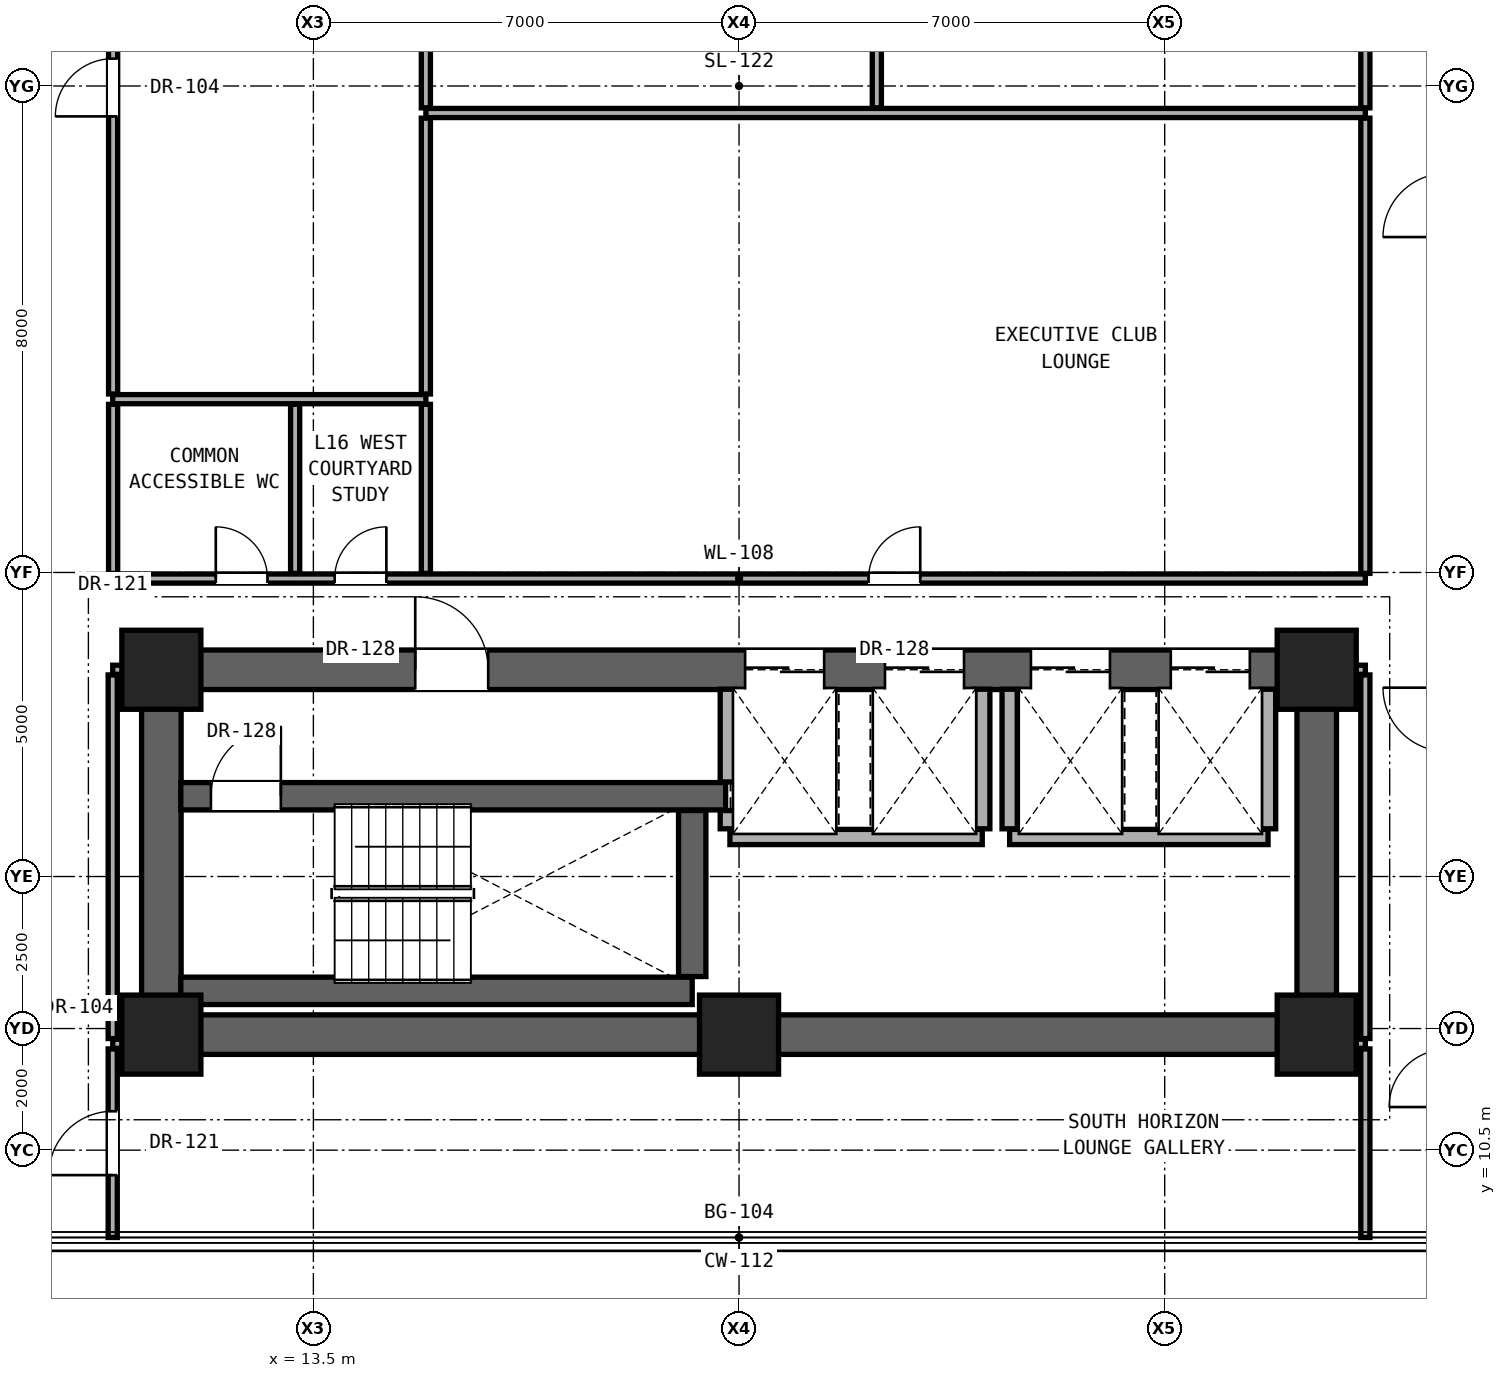
"""IFC4 building model, lengths in metres.
Left out: names, types, materials, properties, quantities, classifications, styles, units other than length and angle.
Written with IfcOpenShell. Run it as: python <this file> out.ifc"""

import sys

from ifc_helpers import new_model, si_unit, direction, frame, frame_2d, origin, origin_2d, place, context, subcontext, project, spatial, rectangle, extrude, element, fill, save


model = new_model("IFC4")
c1 = context("Model", 3, precision=1e-05, world=origin(), true_north=direction((0.0, 1.0)))
c2 = subcontext(c1, "Body", "Model", "MODEL_VIEW")
j1 = project(units=[si_unit("LENGTHUNIT", "METRE"), si_unit("PLANEANGLEUNIT", "RADIAN")], contexts=[c1])
p1 = place(None, origin())
s1 = spatial("IfcSite", under=j1, at=p1, CompositionType="ELEMENT")
p2 = place(p1, origin())
s2 = spatial("IfcBuilding", under=s1, at=p2, CompositionType="ELEMENT")
p3 = place(p2, frame((0.0, 0.0, 58.7)))
s3 = spatial("IfcBuildingStorey", under=s2, at=p3, CompositionType="ELEMENT", Elevation=58.7)
for number, where, z_axis, x_axis in (
    (1, (11.0, 12.4, 0.0), (0.0, 0.0, 1.0), (1.0, 0.0, 0.0)),
    (2, (20.5, 12.4, 0.0), (0.0, 0.0, 1.0), (1.0, 0.0, 0.0)),
    (3, (30.0, 12.4, 0.0), (0.0, 0.0, 1.0), (1.0, 0.0, 0.0)),
    (4, (11.0, 18.4, 0.0), (0.0, 0.0, 1.0), (1.0, 0.0, 0.0)),
    (5, (30.0, 18.4, 0.0), (0.0, 0.0, 1.0), (1.0, 0.0, 0.0)),
):
    element("IfcColumn", number, at=place(p3, frame(where, z_axis=z_axis, x_axis=x_axis)), inside=s3, PredefinedType="COLUMN", context=c2, shape_type="SweptSolid", body=[
        extrude(rectangle(XDim=1.3, YDim=1.3, at=origin_2d()), origin(), (0.0, 0.0, 1.0), 3.3),
    ])
p4 = place(p3, frame((11.0, 12.4, 0.0), z_axis=(0.0, 0.0, 1.0), x_axis=(1.0, 0.0, 0.0)))
e6 = element("IfcWall", 6, at=p4, inside=s3, PredefinedType="SHEAR", context=c2, shape_type="SweptSolid", body=[
    extrude(rectangle(XDim=19.0, YDim=0.65, at=frame_2d((9.5, 0.0))), origin(), (0.0, 0.0, 1.0), 3.06),
])
for number, where, z_axis, x_axis in (
    (7, (11.0, 12.4, 0.0), (0.0, 0.0, 1.0), (0.0, 1.0, 0.0)),
    (8, (30.0, 12.4, 0.0), (0.0, 0.0, 1.0), (0.0, 1.0, 0.0)),
):
    element("IfcWall", number, at=place(p3, frame(where, z_axis=z_axis, x_axis=x_axis)), inside=s3, PredefinedType="SHEAR", context=c2, shape_type="SweptSolid", body=[
        extrude(rectangle(XDim=6.0, YDim=0.65, at=frame_2d((3.0, 0.0))), origin(), (0.0, 0.0, 1.0), 3.06),
    ])
p5 = place(p3, frame((11.0, 18.4, 0.0), z_axis=(0.0, 0.0, 1.0), x_axis=(1.0, 0.0, 0.0)))
e9 = element("IfcWall", 9, at=p5, inside=s3, PredefinedType="SHEAR", context=c2, shape_type="SweptSolid", body=[
    extrude(rectangle(XDim=19.0, YDim=0.65, at=frame_2d((9.5, 0.0))), origin(), (0.0, 0.0, 1.0), 3.06),
])
p6 = place(p5, frame((4.175, 0.0, 0.0)))
e10 = element("IfcOpeningElement", 10, at=p6, cuts=e9, PredefinedType="OPENING", context=c2, shape_type="SweptSolid", body=[
    extrude(rectangle(XDim=1.2, YDim=2.25, at=frame_2d((0.6, 1.125))), frame((0.0, 0.335, 0.0), z_axis=(0.0, -1.0, 0.0), x_axis=(1.0, 0.0, 0.0)), (0.0, 0.0, 1.0), 0.67),
])
p7 = place(p5, frame((9.6, 0.0, 0.0)))
e11 = element("IfcOpeningElement", 11, at=p7, cuts=e9, PredefinedType="OPENING", context=c2, shape_type="SweptSolid", body=[
    extrude(rectangle(XDim=1.3, YDim=2.3, at=frame_2d((0.65, 1.15))), frame((0.0, 0.335, 0.0), z_axis=(0.0, -1.0, 0.0), x_axis=(1.0, 0.0, 0.0)), (0.0, 0.0, 1.0), 0.67),
])
p8 = place(p5, frame((11.9, 0.0, 0.0)))
e12 = element("IfcOpeningElement", 12, at=p8, cuts=e9, PredefinedType="OPENING", context=c2, shape_type="SweptSolid", body=[
    extrude(rectangle(XDim=1.3, YDim=2.3, at=frame_2d((0.65, 1.15))), frame((0.0, 0.335, 0.0), z_axis=(0.0, -1.0, 0.0), x_axis=(1.0, 0.0, 0.0)), (0.0, 0.0, 1.0), 0.67),
])
p9 = place(p5, frame((14.3, 0.0, 0.0)))
e13 = element("IfcOpeningElement", 13, at=p9, cuts=e9, PredefinedType="OPENING", context=c2, shape_type="SweptSolid", body=[
    extrude(rectangle(XDim=1.3, YDim=2.3, at=frame_2d((0.65, 1.15))), frame((0.0, 0.335, 0.0), z_axis=(0.0, -1.0, 0.0), x_axis=(1.0, 0.0, 0.0)), (0.0, 0.0, 1.0), 0.67),
])
p10 = place(p5, frame((16.6, 0.0, 0.0)))
e14 = element("IfcOpeningElement", 14, at=p10, cuts=e9, PredefinedType="OPENING", context=c2, shape_type="SweptSolid", body=[
    extrude(rectangle(XDim=1.3, YDim=2.3, at=frame_2d((0.65, 1.15))), frame((0.0, 0.335, 0.0), z_axis=(0.0, -1.0, 0.0), x_axis=(1.0, 0.0, 0.0)), (0.0, 0.0, 1.0), 0.67),
])
for number, where, z_axis, x_axis in (
    (15, (10.2, 12.25, 0.0), (0.0, 0.0, 1.0), (1.0, 0.0, 0.0)),
    (16, (30.32, 12.25, 0.0), (0.0, 0.0, 1.0), (1.0, 0.0, 0.0)),
):
    element("IfcWall", number, at=place(p3, frame(where, z_axis=z_axis, x_axis=x_axis)), inside=s3, PredefinedType="PARTITIONING", context=c2, shape_type="SweptSolid", body=[
        extrude(rectangle(XDim=0.48, YDim=0.15, at=frame_2d((0.24, 0.0))), origin(), (0.0, 0.0, 1.0), 3.06),
    ])
p11 = place(p3, frame((11.32, 13.12, 0.0), z_axis=(0.0, 0.0, 1.0), x_axis=(1.0, 0.0, 0.0)))
e17 = element("IfcWall", 17, at=p11, inside=s3, PredefinedType="SHEAR", context=c2, shape_type="SweptSolid", body=[
    extrude(rectangle(XDim=8.41, YDim=0.45, at=frame_2d((4.205, 0.0))), origin(), (0.0, 0.0, 1.0), 3.06),
])
p12 = place(p3, frame((20.35, 15.65, 0.0), z_axis=(0.0, 0.0, 1.0), x_axis=(1.0, 0.0, 0.0)))
e18 = element("IfcWall", 18, at=p12, inside=s3, PredefinedType="SOLIDWALL", context=c2, shape_type="SweptSolid", body=[
    extrude(rectangle(XDim=4.15, YDim=0.25, at=frame_2d((2.075, 0.0))), origin(), (0.0, 0.0, 1.0), 3.06),
])
p13 = place(p3, frame((24.95, 15.65, 0.0), z_axis=(0.0, 0.0, 1.0), x_axis=(1.0, 0.0, 0.0)))
e19 = element("IfcWall", 19, at=p13, inside=s3, PredefinedType="SOLIDWALL", context=c2, shape_type="SweptSolid", body=[
    extrude(rectangle(XDim=4.25, YDim=0.25, at=frame_2d((2.125, 0.0))), origin(), (0.0, 0.0, 1.0), 3.06),
])
p14 = place(p3, frame((11.32, 16.32, 0.0), z_axis=(0.0, 0.0, 1.0), x_axis=(1.0, 0.0, 0.0)))
e20 = element("IfcWall", 20, at=p14, inside=s3, PredefinedType="SHEAR", context=c2, shape_type="SweptSolid", body=[
    extrude(rectangle(XDim=8.96, YDim=0.45, at=frame_2d((4.48, 0.0))), origin(), (0.0, 0.0, 1.0), 3.06),
])
p15 = place(p14, frame((0.495, 0.0, 0.0)))
e21 = element("IfcOpeningElement", 21, at=p15, cuts=e20, PredefinedType="OPENING", context=c2, shape_type="SweptSolid", body=[
    extrude(rectangle(XDim=1.15, YDim=2.2, at=frame_2d((0.575, 1.1))), frame((0.0, 0.235, 0.0), z_axis=(0.0, -1.0, 0.0), x_axis=(1.0, 0.0, 0.0)), (0.0, 0.0, 1.0), 0.47),
])
for number, where, z_axis, x_axis in (
    (22, (10.2, 18.4, 0.0), (0.0, 0.0, 1.0), (1.0, 0.0, 0.0)),
    (23, (30.32, 18.4, 0.0), (0.0, 0.0, 1.0), (1.0, 0.0, 0.0)),
):
    element("IfcWall", number, at=place(p3, frame(where, z_axis=z_axis, x_axis=x_axis)), inside=s3, PredefinedType="PARTITIONING", context=c2, shape_type="SweptSolid", body=[
        extrude(rectangle(XDim=0.48, YDim=0.15, at=frame_2d((0.24, 0.0))), origin(), (0.0, 0.0, 1.0), 2.436),
    ])
p16 = place(p3, frame((10.2, 19.9, 0.0), z_axis=(0.0, 0.0, 1.0), x_axis=(1.0, 0.0, 0.0)))
e24 = element("IfcWall", 24, at=p16, inside=s3, PredefinedType="PARTITIONING", context=c2, shape_type="SweptSolid", body=[
    extrude(rectangle(XDim=20.6, YDim=0.15, at=frame_2d((10.3, 0.0))), origin(), (0.0, 0.0, 1.0), 2.104),
])
p17 = place(p16, frame((1.695, 0.0, 0.0)))
e25 = element("IfcOpeningElement", 25, at=p17, cuts=e24, PredefinedType="OPENING", context=c2, shape_type="SweptSolid", body=[
    extrude(rectangle(XDim=0.85, YDim=2.01, at=frame_2d((0.425, 1.005))), frame((0.0, 0.085, 0.0), z_axis=(0.0, -1.0, 0.0), x_axis=(1.0, 0.0, 0.0)), (0.0, 0.0, 1.0), 0.17),
])
p18 = place(p16, frame((3.65, 0.0, 0.0)))
e26 = element("IfcOpeningElement", 26, at=p18, cuts=e24, PredefinedType="OPENING", context=c2, shape_type="SweptSolid", body=[
    extrude(rectangle(XDim=0.85, YDim=2.01, at=frame_2d((0.425, 1.005))), frame((0.0, 0.085, 0.0), z_axis=(0.0, -1.0, 0.0), x_axis=(1.0, 0.0, 0.0)), (0.0, 0.0, 1.0), 0.17),
])
p19 = place(p16, frame((12.43, 0.0, 0.0)))
e27 = element("IfcOpeningElement", 27, at=p19, cuts=e24, PredefinedType="OPENING", context=c2, shape_type="SweptSolid", body=[
    extrude(rectangle(XDim=0.85, YDim=2.01, at=frame_2d((0.425, 1.005))), frame((0.0, 0.085, 0.0), z_axis=(0.0, -1.0, 0.0), x_axis=(1.0, 0.0, 0.0)), (0.0, 0.0, 1.0), 0.17),
])
p20 = place(p3, frame((10.2, 22.85, 0.0), z_axis=(0.0, 0.0, 1.0), x_axis=(1.0, 0.0, 0.0)))
e28 = element("IfcWall", 28, at=p20, inside=s3, PredefinedType="PARTITIONING", context=c2, shape_type="SweptSolid", body=[
    extrude(rectangle(XDim=5.15, YDim=0.15, at=frame_2d((2.575, 0.0))), origin(), (0.0, 0.0, 1.0), 2.104),
])
p21 = place(p3, frame((15.35, 27.556, 0.0), z_axis=(0.0, 0.0, 1.0), x_axis=(1.0, 0.0, 0.0)))
e29 = element("IfcWall", 29, at=p21, inside=s3, PredefinedType="PARTITIONING", context=c2, shape_type="SweptSolid", body=[
    extrude(rectangle(XDim=15.45, YDim=0.15, at=frame_2d((7.725, 0.0))), origin(), (0.0, 0.0, 1.0), 2.104),
])
p22 = place(p3, frame((10.2, 9.064, 0.0), z_axis=(0.0, 0.0, 1.0), x_axis=(0.0, 1.0, 0.0)))
e30 = element("IfcWall", 30, at=p22, inside=s3, PredefinedType="PARTITIONING", context=c2, shape_type="SweptSolid", body=[
    extrude(rectangle(XDim=3.101, YDim=0.15, at=frame_2d((1.551, 0.0))), origin(), (0.0, 0.0, 1.0), 3.06),
])
p23 = place(p22, frame((1.025, 0.0, 0.0)))
e31 = element("IfcOpeningElement", 31, at=p23, cuts=e30, PredefinedType="OPENING", context=c2, shape_type="SweptSolid", body=[
    extrude(rectangle(XDim=1.05, YDim=2.2, at=frame_2d((0.525, 1.1))), frame((0.0, 0.085, 0.0), z_axis=(0.0, -1.0, 0.0), x_axis=(1.0, 0.0, 0.0)), (0.0, 0.0, 1.0), 0.17),
])
p24 = place(p3, frame((10.2, 12.335, 0.0), z_axis=(0.0, 0.0, 1.0), x_axis=(0.0, 1.0, 0.0)))
e32 = element("IfcWall", 32, at=p24, inside=s3, PredefinedType="PARTITIONING", context=c2, shape_type="SweptSolid", body=[
    extrude(rectangle(XDim=5.98, YDim=0.15, at=frame_2d((2.99, 0.0))), origin(), (0.0, 0.0, 1.0), 2.436),
])
p25 = place(p3, frame((10.207, 19.985, 0.0), z_axis=(0.0, 0.0, 1.0), x_axis=(0.0, 1.0, 0.0)))
e33 = element("IfcWall", 33, at=p25, inside=s3, PredefinedType="PARTITIONING", context=c2, shape_type="SweptSolid", body=[
    extrude(rectangle(XDim=2.78, YDim=0.15, at=frame_2d((1.39, 0.0))), origin(), (0.0, 0.0, 1.0), 3.06),
])
p26 = place(p3, frame((10.207, 22.935, 0.0), z_axis=(0.0, 0.0, 1.0), x_axis=(0.0, 1.0, 0.0)))
e34 = element("IfcWall", 34, at=p26, inside=s3, PredefinedType="PARTITIONING", context=c2, shape_type="SweptSolid", body=[
    extrude(rectangle(XDim=10.08, YDim=0.15, at=frame_2d((5.04, 0.0))), origin(), (0.0, 0.0, 1.0), 2.279),
])
p27 = place(p26, frame((4.565, 0.0, 0.0)))
e35 = element("IfcOpeningElement", 35, at=p27, cuts=e34, PredefinedType="OPENING", context=c2, shape_type="SweptSolid", body=[
    extrude(rectangle(XDim=0.95, YDim=2.15, at=frame_2d((0.475, 1.075))), frame((0.0, 0.085, 0.0), z_axis=(0.0, -1.0, 0.0), x_axis=(1.0, 0.0, 0.0)), (0.0, 0.0, 1.0), 0.17),
])
for number, where, z_axis, x_axis in (
    (36, (13.2, 19.985, 0.0), (0.0, 0.0, 1.0), (0.0, 1.0, 0.0)),
    (37, (15.35, 19.985, 0.0), (0.0, 0.0, 1.0), (0.0, 1.0, 0.0)),
):
    element("IfcWall", number, at=place(p3, frame(where, z_axis=z_axis, x_axis=x_axis)), inside=s3, PredefinedType="PARTITIONING", context=c2, shape_type="SweptSolid", body=[
        extrude(rectangle(XDim=2.78, YDim=0.15, at=frame_2d((1.39, 0.0))), origin(), (0.0, 0.0, 1.0), 3.06),
    ])
p28 = place(p3, frame((15.35, 22.935, 0.0), z_axis=(0.0, 0.0, 1.0), x_axis=(0.0, 1.0, 0.0)))
e38 = element("IfcWall", 38, at=p28, inside=s3, PredefinedType="PARTITIONING", context=c2, shape_type="SweptSolid", body=[
    extrude(rectangle(XDim=4.536, YDim=0.15, at=frame_2d((2.268, 0.0))), origin(), (0.0, 0.0, 1.0), 2.104),
])
p29 = place(p3, frame((15.35, 27.641, 0.0), z_axis=(0.0, 0.0, 1.0), x_axis=(0.0, 1.0, 0.0)))
e39 = element("IfcWall", 39, at=p29, inside=s3, PredefinedType="PARTITIONING", context=c2, shape_type="SweptSolid", body=[
    extrude(rectangle(XDim=5.374, YDim=0.15, at=frame_2d((2.687, 0.0))), origin(), (0.0, 0.0, 1.0), 2.104),
])
p30 = place(p3, frame((19.73, 13.355, 0.0), z_axis=(0.0, 0.0, 1.0), x_axis=(0.0, 1.0, 0.0)))
e40 = element("IfcWall", 40, at=p30, inside=s3, PredefinedType="SHEAR", context=c2, shape_type="SweptSolid", body=[
    extrude(rectangle(XDim=2.73, YDim=0.45, at=frame_2d((1.365, 0.0))), origin(), (0.0, 0.0, 1.0), 3.06),
])
p31 = place(p3, frame((20.315, 15.785, 0.0), z_axis=(0.0, 0.0, 1.0), x_axis=(0.0, 1.0, 0.0)))
e41 = element("IfcWall", 41, at=p31, inside=s3, PredefinedType="SOLIDWALL", context=c2, shape_type="SweptSolid", body=[
    extrude(rectangle(XDim=0.3, YDim=0.25, at=frame_2d((0.15, 0.0))), origin(), (0.0, 0.0, 1.0), 3.06),
])
p32 = place(p3, frame((20.315, 16.555, 0.0), z_axis=(0.0, 0.0, 1.0), x_axis=(0.0, 1.0, 0.0)))
e42 = element("IfcWall", 42, at=p32, inside=s3, PredefinedType="SOLIDWALL", context=c2, shape_type="SweptSolid", body=[
    extrude(rectangle(XDim=1.525, YDim=0.25, at=frame_2d((0.763, 0.0))), origin(), (0.0, 0.0, 1.0), 3.06),
])
p33 = place(p3, frame((22.766, 27.641, 0.0), z_axis=(0.0, 0.0, 1.0), x_axis=(0.0, 1.0, 0.0)))
e43 = element("IfcWall", 43, at=p33, inside=s3, PredefinedType="PARTITIONING", context=c2, shape_type="SweptSolid", body=[
    extrude(rectangle(XDim=5.374, YDim=0.15, at=frame_2d((2.687, 0.0))), origin(), (0.0, 0.0, 1.0), 2.104),
])
for number, where, z_axis, x_axis in (
    (44, (24.5, 15.785, 0.0), (0.0, 0.0, 1.0), (0.0, 1.0, 0.0)),
    (45, (24.95, 15.785, 0.0), (0.0, 0.0, 1.0), (0.0, 1.0, 0.0)),
    (46, (29.2, 15.785, 0.0), (0.0, 0.0, 1.0), (0.0, 1.0, 0.0)),
):
    element("IfcWall", number, at=place(p3, frame(where, z_axis=z_axis, x_axis=x_axis)), inside=s3, PredefinedType="SOLIDWALL", context=c2, shape_type="SweptSolid", body=[
        extrude(rectangle(XDim=2.295, YDim=0.25, at=frame_2d((1.147, 0.0))), origin(), (0.0, 0.0, 1.0), 3.06),
    ])
p34 = place(p3, frame((30.8, 9.064, 0.0), z_axis=(0.0, 0.0, 1.0), x_axis=(0.0, 1.0, 0.0)))
e47 = element("IfcWall", 47, at=p34, inside=s3, PredefinedType="PARTITIONING", context=c2, shape_type="SweptSolid", body=[
    extrude(rectangle(XDim=3.101, YDim=0.15, at=frame_2d((1.551, 0.0))), origin(), (0.0, 0.0, 1.0), 3.06),
])
p35 = place(p3, frame((30.8, 12.335, 0.0), z_axis=(0.0, 0.0, 1.0), x_axis=(0.0, 1.0, 0.0)))
e48 = element("IfcWall", 48, at=p35, inside=s3, PredefinedType="PARTITIONING", context=c2, shape_type="SweptSolid", body=[
    extrude(rectangle(XDim=5.98, YDim=0.15, at=frame_2d((2.99, 0.0))), origin(), (0.0, 0.0, 1.0), 2.436),
])
p36 = place(p3, frame((30.8, 19.985, 0.0), z_axis=(0.0, 0.0, 1.0), x_axis=(0.0, 1.0, 0.0)))
e49 = element("IfcWall", 49, at=p36, inside=s3, PredefinedType="PARTITIONING", context=c2, shape_type="SweptSolid", body=[
    extrude(rectangle(XDim=7.486, YDim=0.15, at=frame_2d((3.743, 0.0))), origin(), (0.0, 0.0, 1.0), 2.279),
])
p37 = place(p3, frame((30.8, 27.641, 0.0), z_axis=(0.0, 0.0, 1.0), x_axis=(0.0, 1.0, 0.0)))
e50 = element("IfcWall", 50, at=p37, inside=s3, PredefinedType="PARTITIONING", context=c2, shape_type="SweptSolid", body=[
    extrude(rectangle(XDim=5.374, YDim=0.15, at=frame_2d((2.687, 0.0))), origin(), (0.0, 0.0, 1.0), 2.279),
])
p38 = place(p6, origin())
e51 = element("IfcDoor", 51, at=p38, inside=s3, OperationType="SINGLE_SWING_LEFT", PredefinedType="DOOR", context=c2, shape_type="SweptSolid", body=[
    extrude(rectangle(XDim=1.2, YDim=2.25, at=frame_2d((0.6, 1.125))), frame((0.0, 0.025, 0.0), z_axis=(0.0, -1.0, 0.0), x_axis=(1.0, 0.0, 0.0)), (0.0, 0.0, 1.0), 0.05),
])
fill(e10, e51)
p39 = place(p15, origin())
e52 = element("IfcDoor", 52, at=p39, inside=s3, OperationType="SINGLE_SWING_RIGHT", PredefinedType="DOOR", context=c2, shape_type="SweptSolid", body=[
    extrude(rectangle(XDim=1.15, YDim=2.2, at=frame_2d((0.575, 1.1))), frame((0.0, 0.025, 0.0), z_axis=(0.0, -1.0, 0.0), x_axis=(1.0, 0.0, 0.0)), (0.0, 0.0, 1.0), 0.05),
])
fill(e21, e52)
p40 = place(p17, origin())
e53 = element("IfcDoor", 53, at=p40, inside=s3, OperationType="SINGLE_SWING_LEFT", PredefinedType="DOOR", context=c2, shape_type="SweptSolid", body=[
    extrude(rectangle(XDim=0.85, YDim=2.01, at=frame_2d((0.425, 1.005))), frame((0.0, 0.025, 0.0), z_axis=(0.0, -1.0, 0.0), x_axis=(1.0, 0.0, 0.0)), (0.0, 0.0, 1.0), 0.05),
])
fill(e25, e53)
p41 = place(p18, origin())
e54 = element("IfcDoor", 54, at=p41, inside=s3, OperationType="SINGLE_SWING_RIGHT", PredefinedType="DOOR", context=c2, shape_type="SweptSolid", body=[
    extrude(rectangle(XDim=0.85, YDim=2.01, at=frame_2d((0.425, 1.005))), frame((0.0, 0.025, 0.0), z_axis=(0.0, -1.0, 0.0), x_axis=(1.0, 0.0, 0.0)), (0.0, 0.0, 1.0), 0.05),
])
fill(e26, e54)
p42 = place(p27, origin())
e55 = element("IfcDoor", 55, at=p42, inside=s3, OperationType="SINGLE_SWING_LEFT", PredefinedType="DOOR", context=c2, shape_type="SweptSolid", body=[
    extrude(rectangle(XDim=0.95, YDim=2.15, at=frame_2d((0.475, 1.075))), frame((0.0, 0.025, 0.0), z_axis=(0.0, -1.0, 0.0), x_axis=(1.0, 0.0, 0.0)), (0.0, 0.0, 1.0), 0.05),
])
fill(e35, e55)
p43 = place(p19, origin())
e56 = element("IfcDoor", 56, at=p43, inside=s3, OperationType="SINGLE_SWING_RIGHT", PredefinedType="DOOR", context=c2, shape_type="SweptSolid", body=[
    extrude(rectangle(XDim=0.85, YDim=2.01, at=frame_2d((0.425, 1.005))), frame((0.0, 0.025, 0.0), z_axis=(0.0, -1.0, 0.0), x_axis=(1.0, 0.0, 0.0)), (0.0, 0.0, 1.0), 0.05),
])
fill(e27, e56)
p44 = place(p23, origin())
e57 = element("IfcDoor", 57, at=p44, inside=s3, OperationType="SINGLE_SWING_LEFT", PredefinedType="DOOR", context=c2, shape_type="SweptSolid", body=[
    extrude(rectangle(XDim=1.05, YDim=2.2, at=frame_2d((0.525, 1.1))), frame((0.0, 0.025, 0.0), z_axis=(0.0, -1.0, 0.0), x_axis=(1.0, 0.0, 0.0)), (0.0, 0.0, 1.0), 0.05),
])
fill(e31, e57)
p45 = place(p7, origin())
e58 = element("IfcDoor", 58, at=p45, inside=s3, OperationType="DOUBLE_DOOR_SLIDING", PredefinedType="DOOR", context=c2, shape_type="SweptSolid", body=[
    extrude(rectangle(XDim=1.3, YDim=2.3, at=frame_2d((0.65, 1.15))), frame((0.0, 0.025, 0.0), z_axis=(0.0, -1.0, 0.0), x_axis=(1.0, 0.0, 0.0)), (0.0, 0.0, 1.0), 0.05),
])
fill(e11, e58)
p46 = place(p8, origin())
e59 = element("IfcDoor", 59, at=p46, inside=s3, OperationType="DOUBLE_DOOR_SLIDING", PredefinedType="DOOR", context=c2, shape_type="SweptSolid", body=[
    extrude(rectangle(XDim=1.3, YDim=2.3, at=frame_2d((0.65, 1.15))), frame((0.0, 0.025, 0.0), z_axis=(0.0, -1.0, 0.0), x_axis=(1.0, 0.0, 0.0)), (0.0, 0.0, 1.0), 0.05),
])
fill(e12, e59)
p47 = place(p9, origin())
e60 = element("IfcDoor", 60, at=p47, inside=s3, OperationType="DOUBLE_DOOR_SLIDING", PredefinedType="DOOR", context=c2, shape_type="SweptSolid", body=[
    extrude(rectangle(XDim=1.3, YDim=2.3, at=frame_2d((0.65, 1.15))), frame((0.0, 0.025, 0.0), z_axis=(0.0, -1.0, 0.0), x_axis=(1.0, 0.0, 0.0)), (0.0, 0.0, 1.0), 0.05),
])
fill(e13, e60)
p48 = place(p10, origin())
e61 = element("IfcDoor", 61, at=p48, inside=s3, OperationType="DOUBLE_DOOR_SLIDING", PredefinedType="DOOR", context=c2, shape_type="SweptSolid", body=[
    extrude(rectangle(XDim=1.3, YDim=2.3, at=frame_2d((0.65, 1.15))), frame((0.0, 0.025, 0.0), z_axis=(0.0, -1.0, 0.0), x_axis=(1.0, 0.0, 0.0)), (0.0, 0.0, 1.0), 0.05),
])
fill(e14, e61)
save(model, sys.argv[1])
